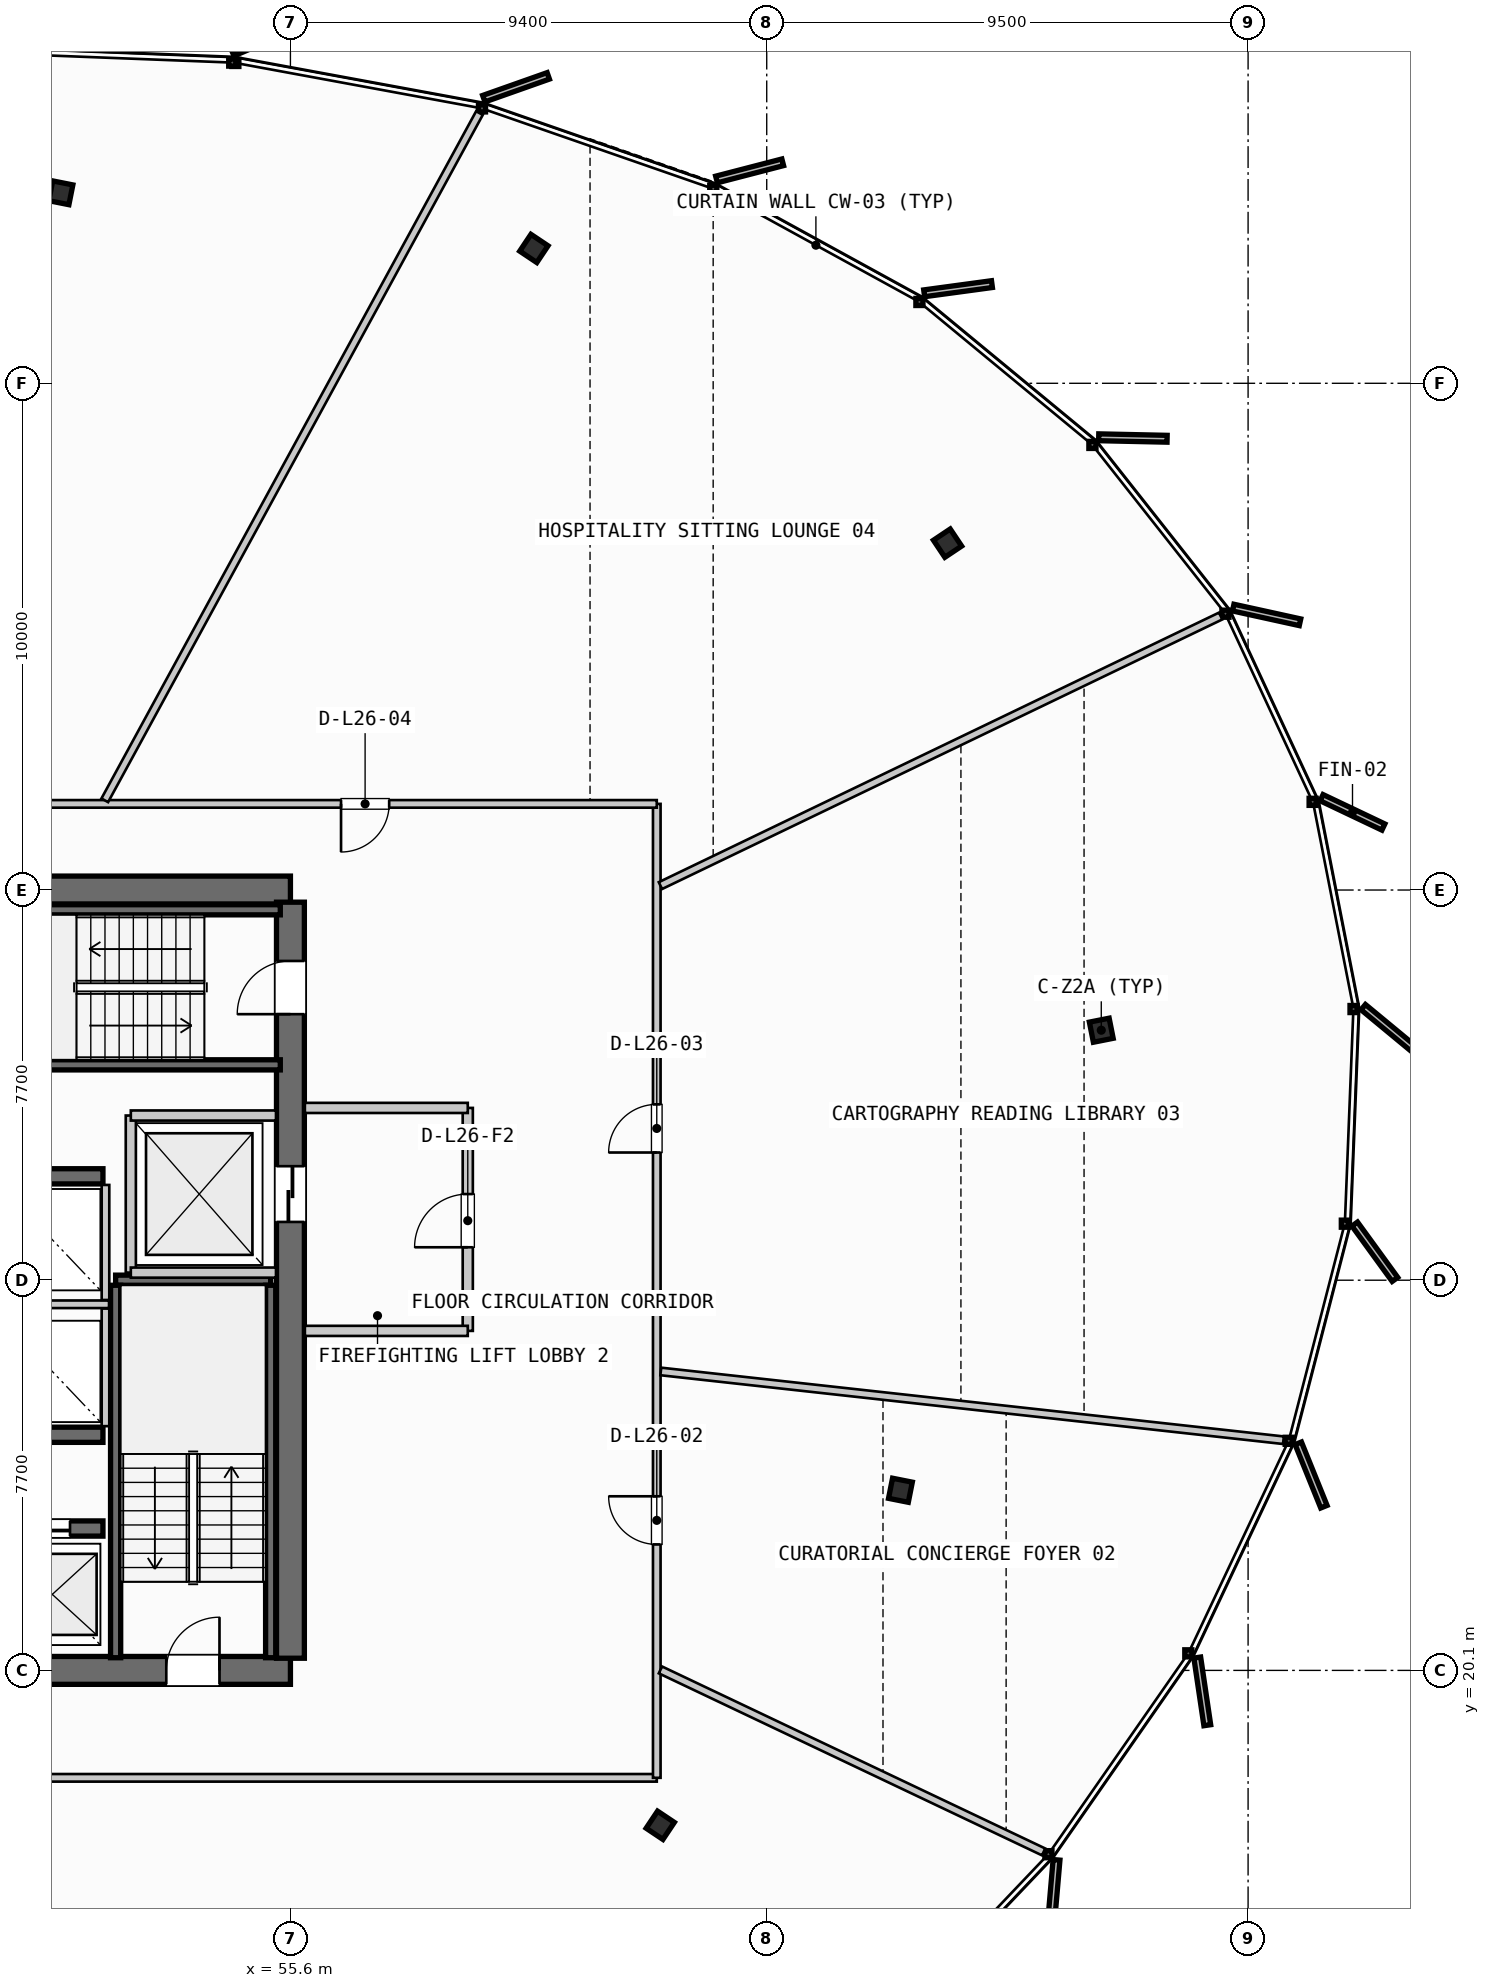
"""IFC4 building model, lengths in metres.
Left out: names, types, materials, properties, quantities, classifications, styles, units other than length and angle.
Written with IfcOpenShell. Run it as: python <this file> out.ifc"""

import sys

from ifc_helpers import new_model, si_unit, direction, frame, frame_2d, origin, origin_2d, place, context, subcontext, project, spatial, rectangle, i_section, extrude, source, transform, mapped, element, fill, save


model = new_model("IFC4")
c1 = context("Model", 3, precision=1e-05, world=origin(), true_north=direction((0.0, 1.0)))
c2 = subcontext(c1, "Body", "Model", "MODEL_VIEW")
j1 = project(units=[si_unit("LENGTHUNIT", "METRE"), si_unit("PLANEANGLEUNIT", "RADIAN")], contexts=[c1])
p1 = place(None, origin())
s1 = spatial("IfcSite", under=j1, at=p1, CompositionType="ELEMENT")
p2 = place(p1, origin())
s2 = spatial("IfcBuilding", under=s1, at=p2, CompositionType="ELEMENT")
p3 = place(p2, frame((0.0, 0.0, 107.2)))
s3 = spatial("IfcBuildingStorey", under=s2, at=p3, CompositionType="ELEMENT", Elevation=107.2)
p4 = place(p3, frame((38.0, 20.1, 0.0), z_axis=(0.0, 0.0, 1.0), x_axis=(1.0, 0.0, 0.0)))
e1 = element("IfcWall", 1, at=p4, inside=s3, PredefinedType="SHEAR", context=c2, shape_type="SweptSolid", body=[
    extrude(rectangle(XDim=17.6, YDim=0.55, at=frame_2d((8.8, 0.0))), origin(), (0.0, 0.0, 1.0), 3.35),
])
p5 = place(p4, frame((1.4, 0.0, 0.0)))
e2 = element("IfcOpeningElement", 2, at=p5, cuts=e1, PredefinedType="OPENING", context=c2, shape_type="SweptSolid", body=[
    extrude(rectangle(XDim=1.05, YDim=2.15, at=frame_2d((0.525, 1.075))), frame((0.0, 0.285, 0.0), z_axis=(0.0, -1.0, 0.0), x_axis=(1.0, 0.0, 0.0)), (0.0, 0.0, 1.0), 0.57),
])
p6 = place(p4, frame((15.15, 0.0, 0.0)))
e3 = element("IfcOpeningElement", 3, at=p6, cuts=e1, PredefinedType="OPENING", context=c2, shape_type="SweptSolid", body=[
    extrude(rectangle(XDim=1.05, YDim=2.15, at=frame_2d((0.525, 1.075))), frame((0.0, 0.285, 0.0), z_axis=(0.0, -1.0, 0.0), x_axis=(1.0, 0.0, 0.0)), (0.0, 0.0, 1.0), 0.57),
])
p7 = place(p3, frame((55.6, 35.5, 0.0), z_axis=(0.0, 0.0, 1.0), x_axis=(-1.0, 0.0, 0.0)))
e4 = element("IfcWall", 4, at=p7, inside=s3, PredefinedType="SHEAR", context=c2, shape_type="SweptSolid", body=[
    extrude(rectangle(XDim=17.6, YDim=0.55, at=frame_2d((8.8, 0.0))), origin(), (0.0, 0.0, 1.0), 3.35),
])
p8 = place(p7, frame((8.05, 0.0, 0.0)))
e5 = element("IfcOpeningElement", 5, at=p8, cuts=e4, PredefinedType="OPENING", context=c2, shape_type="SweptSolid", body=[
    extrude(rectangle(XDim=1.5, YDim=2.2, at=frame_2d((0.75, 1.1))), frame((0.0, 0.285, 0.0), z_axis=(0.0, -1.0, 0.0), x_axis=(1.0, 0.0, 0.0)), (0.0, 0.0, 1.0), 0.57),
])
p9 = place(p7, frame((14.95, 0.0, 0.0)))
e6 = element("IfcOpeningElement", 6, at=p9, cuts=e4, PredefinedType="OPENING", context=c2, shape_type="SweptSolid", body=[
    extrude(rectangle(XDim=1.4, YDim=2.3, at=frame_2d((0.7, 1.15))), frame((0.0, 0.285, 0.0), z_axis=(0.0, -1.0, 0.0), x_axis=(1.0, 0.0, 0.0)), (0.0, 0.0, 1.0), 0.57),
])
p10 = place(p7, frame((12.9, 0.0, 0.0)))
e7 = element("IfcOpeningElement", 7, at=p10, cuts=e4, PredefinedType="OPENING", context=c2, shape_type="SweptSolid", body=[
    extrude(rectangle(XDim=0.9, YDim=2.15, at=frame_2d((0.45, 1.075))), frame((0.0, 0.285, 0.0), z_axis=(0.0, -1.0, 0.0), x_axis=(1.0, 0.0, 0.0)), (0.0, 0.0, 1.0), 0.57),
])
p11 = place(p7, frame((10.6, 0.0, 0.0)))
e8 = element("IfcOpeningElement", 8, at=p11, cuts=e4, PredefinedType="OPENING", context=c2, shape_type="SweptSolid", body=[
    extrude(rectangle(XDim=0.95, YDim=2.15, at=frame_2d((0.475, 1.075))), frame((0.0, 0.285, 0.0), z_axis=(0.0, -1.0, 0.0), x_axis=(1.0, 0.0, 0.0)), (0.0, 0.0, 1.0), 0.57),
])
p12 = place(p3, frame((55.6, 20.34, 0.0), z_axis=(0.0, 0.0, 1.0), x_axis=(0.0, 1.0, 0.0)))
e9 = element("IfcWall", 9, at=p12, inside=s3, PredefinedType="SHEAR", context=c2, shape_type="SweptSolid", body=[
    extrude(rectangle(XDim=14.92, YDim=0.55, at=frame_2d((7.46, 0.0))), origin(), (0.0, 0.0, 1.0), 3.35),
])
p13 = place(p12, frame((12.71, 0.0, 0.0)))
e10 = element("IfcOpeningElement", 10, at=p13, cuts=e9, PredefinedType="OPENING", context=c2, shape_type="SweptSolid", body=[
    extrude(rectangle(XDim=1.05, YDim=2.15, at=frame_2d((0.525, 1.075))), frame((0.0, 0.285, 0.0), z_axis=(0.0, -1.0, 0.0), x_axis=(1.0, 0.0, 0.0)), (0.0, 0.0, 1.0), 0.57),
])
p14 = place(p12, frame((8.61, 0.0, 0.0)))
e11 = element("IfcOpeningElement", 11, at=p14, cuts=e9, PredefinedType="OPENING", context=c2, shape_type="SweptSolid", body=[
    extrude(rectangle(XDim=1.1, YDim=2.2, at=frame_2d((0.55, 1.1))), frame((0.0, 0.285, 0.0), z_axis=(0.0, -1.0, 0.0), x_axis=(1.0, 0.0, 0.0)), (0.0, 0.0, 1.0), 0.57),
])
p15 = place(p3, frame((47.65, 22.9, 0.0), z_axis=(0.0, 0.0, 1.0), x_axis=(1.0, 0.0, 0.0)))
e12 = element("IfcWall", 12, at=p15, inside=s3, PredefinedType="SHEAR", context=c2, shape_type="SweptSolid", body=[
    extrude(rectangle(XDim=4.25, YDim=0.3, at=frame_2d((2.125, 0.0))), origin(), (0.0, 0.0, 1.0), 3.35),
])
p16 = place(p15, frame((0.45, 0.0, 0.0)))
e13 = element("IfcOpeningElement", 13, at=p16, cuts=e12, PredefinedType="OPENING", context=c2, shape_type="SweptSolid", body=[
    extrude(rectangle(XDim=1.1, YDim=2.2, at=frame_2d((0.55, 1.1))), frame((0.0, 0.16, 0.0), z_axis=(0.0, -1.0, 0.0), x_axis=(1.0, 0.0, 0.0)), (0.0, 0.0, 1.0), 0.32),
])
p17 = place(p15, frame((2.5, 0.0, 0.0)))
e14 = element("IfcOpeningElement", 14, at=p17, cuts=e12, PredefinedType="OPENING", context=c2, shape_type="SweptSolid", body=[
    extrude(rectangle(XDim=1.1, YDim=2.2, at=frame_2d((0.55, 1.1))), frame((0.0, 0.16, 0.0), z_axis=(0.0, -1.0, 0.0), x_axis=(1.0, 0.0, 0.0)), (0.0, 0.0, 1.0), 0.32),
])
for number, where, z_axis, x_axis in (
    (15, (47.65, 24.75, 0.0), (0.0, 0.0, 1.0), (1.0, 0.0, 0.0)),
    (16, (47.65, 29.85, 0.0), (0.0, 0.0, 1.0), (1.0, 0.0, 0.0)),
):
    element("IfcWall", number, at=place(p3, frame(where, z_axis=z_axis, x_axis=x_axis)), inside=s3, PredefinedType="SHEAR", context=c2, shape_type="SweptSolid", body=[
        extrude(rectangle(XDim=4.25, YDim=0.3, at=frame_2d((2.125, 0.0))), origin(), (0.0, 0.0, 1.0), 3.35),
    ])
m1 = source(origin(), c2, "Body", "SweptSolid", [
    extrude(i_section(OverallWidth=0.405, OverallDepth=0.398, WebThickness=0.035, FlangeThickness=0.056, FilletRadius=0.015, at=origin_2d()), origin(), (0.0, 0.0, 1.0), 3.35),
])
for number, where, z_axis, x_axis in (
    (17, (71.603, 32.733, 0.0), (0.0, 0.0, 1.0), (0.981, 0.195, 0.0)),
    (18, (68.569, 42.345, 0.0), (0.0, 0.0, 1.0), (0.831, 0.556, 0.0)),
    (19, (60.405, 48.161, 0.0), (0.0, 0.0, 1.0), (0.556, 0.831, 0.0)),
    (20, (51.069, 49.259, 0.0), (0.0, 0.0, 1.0), (0.195, 0.981, 0.0)),
    (21, (62.899, 17.043, 0.0), (0.0, 0.0, 1.0), (0.831, -0.556, 0.0)),
    (22, (67.639, 23.655, 0.0), (0.0, 0.0, 1.0), (0.981, -0.195, 0.0)),
):
    element("IfcColumn", number, at=place(p3, frame(where, z_axis=z_axis, x_axis=x_axis)), inside=s3, PredefinedType="COLUMN", context=c2, shape_type="MappedRepresentation", body=[
        mapped(m1, transform((0.0, 0.0, 0.0), scale=1.0)),
    ])
p18 = place(p3, frame((52.15, 27.8, 0.0), z_axis=(0.0, 0.0, 1.0), x_axis=(1.0, 0.0, 0.0)))
e23 = element("IfcWall", 23, at=p18, inside=s3, PredefinedType="SHEAR", context=c2, shape_type="SweptSolid", body=[
    extrude(rectangle(XDim=3.06, YDim=0.2, at=frame_2d((1.53, 0.0))), origin(), (0.0, 0.0, 1.0), 3.35),
])
for number, where, z_axis, x_axis in (
    (24, (55.21, 27.7, 0.0), (0.0, 0.0, 1.0), (0.0, -1.0, 0.0)),
    (25, (52.15, 20.35, 0.0), (0.0, 0.0, 1.0), (0.0, 1.0, 0.0)),
    (26, (48.05, 35.11, 0.0), (0.0, 0.0, 1.0), (1.0, 0.0, 0.0)),
    (27, (55.4, 32.05, 0.0), (0.0, 0.0, 1.0), (-1.0, 0.0, 0.0)),
):
    element("IfcWall", number, at=place(p3, frame(where, z_axis=z_axis, x_axis=x_axis)), inside=s3, PredefinedType="SHEAR", context=c2, shape_type="SweptSolid", body=[
        extrude(rectangle(XDim=7.35, YDim=0.2, at=frame_2d((3.675, 0.0))), origin(), (0.0, 0.0, 1.0), 3.35),
    ])
p19 = place(p3, frame((52.45, 27.95, 0.0), z_axis=(0.0, 0.0, 1.0), x_axis=(0.0, 1.0, 0.0)))
e28 = element("IfcWall", 28, at=p19, inside=s3, PredefinedType="PARTITIONING", context=c2, shape_type="SweptSolid", body=[
    extrude(rectangle(XDim=3.1, YDim=0.2, at=frame_2d((1.55, 0.0))), origin(), (0.0, 0.0, 1.0), 2.28),
])
for number, where, z_axis, x_axis in (
    (29, (52.45, 27.95, 0.0), (0.0, 0.0, 1.0), (1.0, 0.0, 0.0)),
    (30, (52.45, 31.05, 0.0), (0.0, 0.0, 1.0), (1.0, 0.0, 0.0)),
):
    element("IfcWall", number, at=place(p3, frame(where, z_axis=z_axis, x_axis=x_axis)), inside=s3, PredefinedType="PARTITIONING", context=c2, shape_type="SweptSolid", body=[
        extrude(rectangle(XDim=2.865, YDim=0.2, at=frame_2d((1.433, 0.0))), origin(), (0.0, 0.0, 1.0), 2.28),
    ])
p20 = place(p3, frame((59.1, 26.8, 0.0), z_axis=(0.0, 0.0, 1.0), x_axis=(0.0, 1.0, 0.0)))
e31 = element("IfcWall", 31, at=p20, inside=s3, PredefinedType="PARTITIONING", context=c2, shape_type="SweptSolid", body=[
    extrude(rectangle(XDim=4.4, YDim=0.2, at=frame_2d((2.2, 0.0))), origin(), (0.0, 0.0, 1.0), 2.28),
])
p21 = place(p20, frame((1.65, 0.0, 0.0)))
e32 = element("IfcOpeningElement", 32, at=p21, cuts=e31, PredefinedType="OPENING", context=c2, shape_type="SweptSolid", body=[
    extrude(rectangle(XDim=1.05, YDim=2.15, at=frame_2d((0.525, 1.075))), frame((0.0, 0.11, 0.0), z_axis=(0.0, -1.0, 0.0), x_axis=(1.0, 0.0, 0.0)), (0.0, 0.0, 1.0), 0.22),
])
for number, where, z_axis, x_axis in (
    (33, (55.885, 26.8, 0.0), (0.0, 0.0, 1.0), (1.0, 0.0, 0.0)),
    (34, (55.885, 31.2, 0.0), (0.0, 0.0, 1.0), (1.0, 0.0, 0.0)),
):
    element("IfcWall", number, at=place(p3, frame(where, z_axis=z_axis, x_axis=x_axis)), inside=s3, PredefinedType="PARTITIONING", context=c2, shape_type="SweptSolid", body=[
        extrude(rectangle(XDim=3.215, YDim=0.2, at=frame_2d((1.607, 0.0))), origin(), (0.0, 0.0, 1.0), 2.28),
    ])
p22 = place(p3, frame((47.7, 27.325, 0.0), z_axis=(0.0, 0.0, 1.0), x_axis=(1.0, 0.0, 0.0)))
e35 = element("IfcWall", 35, at=p22, inside=s3, PredefinedType="PARTITIONING", context=c2, shape_type="SweptSolid", body=[
    extrude(rectangle(XDim=4.32, YDim=0.15, at=frame_2d((2.16, 0.0))), origin(), (0.0, 0.0, 1.0), 2.28),
])
p23 = place(p3, frame((51.95, 24.92, 0.0), z_axis=(0.0, 0.0, 1.0), x_axis=(0.0, 1.0, 0.0)))
e36 = element("IfcWall", 36, at=p23, inside=s3, PredefinedType="PARTITIONING", context=c2, shape_type="SweptSolid", body=[
    extrude(rectangle(XDim=2.32, YDim=0.15, at=frame_2d((1.16, 0.0))), origin(), (0.0, 0.0, 1.0), 2.28),
])
p24 = place(p3, frame((51.95, 27.41, 0.0), z_axis=(0.0, 0.0, 1.0), x_axis=(0.0, 1.0, 0.0)))
e37 = element("IfcWall", 37, at=p24, inside=s3, PredefinedType="PARTITIONING", context=c2, shape_type="SweptSolid", body=[
    extrude(rectangle(XDim=2.27, YDim=0.15, at=frame_2d((1.135, 0.0))), origin(), (0.0, 0.0, 1.0), 2.28),
])
p25 = place(p3, frame((32.33, 17.98, 0.0), z_axis=(0.0, 0.0, 1.0), x_axis=(1.0, 0.0, 0.0)))
e38 = element("IfcWall", 38, at=p25, inside=s3, PredefinedType="PARTITIONING", context=c2, shape_type="SweptSolid", body=[
    extrude(rectangle(XDim=30.5, YDim=0.15, at=frame_2d((15.25, 0.0))), origin(), (0.0, 0.0, 1.0), 2.28),
])
p26 = place(p25, frame((14.775, 0.0, 0.0)))
e39 = element("IfcOpeningElement", 39, at=p26, cuts=e38, PredefinedType="OPENING", context=c2, shape_type="SweptSolid", body=[
    extrude(rectangle(XDim=0.95, YDim=2.15, at=frame_2d((0.475, 1.075))), frame((0.0, 0.085, 0.0), z_axis=(0.0, -1.0, 0.0), x_axis=(1.0, 0.0, 0.0)), (0.0, 0.0, 1.0), 0.17),
])
p27 = place(p3, frame((62.83, 17.98, 0.0), z_axis=(0.0, 0.0, 1.0), x_axis=(0.0, 1.0, 0.0)))
e40 = element("IfcWall", 40, at=p27, inside=s3, PredefinedType="PARTITIONING", context=c2, shape_type="SweptSolid", body=[
    extrude(rectangle(XDim=19.22, YDim=0.15, at=frame_2d((9.61, 0.0))), origin(), (0.0, 0.0, 1.0), 2.28),
])
p28 = place(p27, frame((4.606, 0.0, 0.0)))
e41 = element("IfcOpeningElement", 41, at=p28, cuts=e40, PredefinedType="OPENING", context=c2, shape_type="SweptSolid", body=[
    extrude(rectangle(XDim=0.95, YDim=2.15, at=frame_2d((0.475, 1.075))), frame((0.0, 0.085, 0.0), z_axis=(0.0, -1.0, 0.0), x_axis=(1.0, 0.0, 0.0)), (0.0, 0.0, 1.0), 0.17),
])
p29 = place(p27, frame((12.34, 0.0, 0.0)))
e42 = element("IfcOpeningElement", 42, at=p29, cuts=e40, PredefinedType="OPENING", context=c2, shape_type="SweptSolid", body=[
    extrude(rectangle(XDim=0.95, YDim=2.15, at=frame_2d((0.475, 1.075))), frame((0.0, 0.085, 0.0), z_axis=(0.0, -1.0, 0.0), x_axis=(1.0, 0.0, 0.0)), (0.0, 0.0, 1.0), 0.17),
])
p30 = place(p3, frame((62.83, 37.2, 0.0), z_axis=(0.0, 0.0, 1.0), x_axis=(-1.0, 0.0, 0.0)))
e43 = element("IfcWall", 43, at=p30, inside=s3, PredefinedType="PARTITIONING", context=c2, shape_type="SweptSolid", body=[
    extrude(rectangle(XDim=30.5, YDim=0.15, at=frame_2d((15.25, 0.0))), origin(), (0.0, 0.0, 1.0), 2.28),
])
p31 = place(p30, frame((5.281, 0.0, 0.0)))
e44 = element("IfcOpeningElement", 44, at=p31, cuts=e43, PredefinedType="OPENING", context=c2, shape_type="SweptSolid", body=[
    extrude(rectangle(XDim=0.95, YDim=2.15, at=frame_2d((0.475, 1.075))), frame((0.0, 0.085, 0.0), z_axis=(0.0, -1.0, 0.0), x_axis=(1.0, 0.0, 0.0)), (0.0, 0.0, 1.0), 0.17),
])
p32 = place(p30, frame((19.932, 0.0, 0.0)))
e45 = element("IfcOpeningElement", 45, at=p32, cuts=e43, PredefinedType="OPENING", context=c2, shape_type="SweptSolid", body=[
    extrude(rectangle(XDim=0.95, YDim=2.15, at=frame_2d((0.475, 1.075))), frame((0.0, 0.085, 0.0), z_axis=(0.0, -1.0, 0.0), x_axis=(1.0, 0.0, 0.0)), (0.0, 0.0, 1.0), 0.17),
])
p33 = place(p3, frame((62.902, 20.11, 0.0), z_axis=(0.0, 0.0, 1.0), x_axis=(0.903290218611, -0.429030046689, 0.0)))
e46 = element("IfcWall", 46, at=p33, inside=s3, PredefinedType="PARTITIONING", context=c2, shape_type="SweptSolid", body=[
    extrude(rectangle(XDim=8.372, YDim=0.15, at=frame_2d((4.186, 0.0))), origin(), (0.0, 0.0, 1.0), 2.28),
])
p34 = place(p3, frame((62.909, 26.0, 0.0), z_axis=(0.0, 0.0, 1.0), x_axis=(0.993956010133, -0.109779096009, 0.0)))
e47 = element("IfcWall", 47, at=p34, inside=s3, PredefinedType="PARTITIONING", context=c2, shape_type="SweptSolid", body=[
    extrude(rectangle(XDim=12.363, YDim=0.15, at=frame_2d((6.181, 0.0))), origin(), (0.0, 0.0, 1.0), 2.28),
])
p35 = place(p3, frame((62.902, 35.587, 0.0), z_axis=(0.0, 0.0, 1.0), x_axis=(0.901117147689, 0.433575698283, 0.0)))
e48 = element("IfcWall", 48, at=p35, inside=s3, PredefinedType="PARTITIONING", context=c2, shape_type="SweptSolid", body=[
    extrude(rectangle(XDim=12.27, YDim=0.15, at=frame_2d((6.135, 0.0))), origin(), (0.0, 0.0, 1.0), 2.28),
])
p36 = place(p3, frame((51.936, 37.27, 0.0), z_axis=(0.0, 0.0, 1.0), x_axis=(0.47870484944, 0.877975892108, 0.0)))
e49 = element("IfcWall", 49, at=p36, inside=s3, PredefinedType="PARTITIONING", context=c2, shape_type="SweptSolid", body=[
    extrude(rectangle(XDim=15.448, YDim=0.15, at=frame_2d((7.724, 0.0))), origin(), (0.0, 0.0, 1.0), 2.28),
])
m2 = source(origin(), c2, "Body", "SweptSolid", [
    extrude(rectangle(XDim=1.05, YDim=2.15, at=frame_2d((0.525, 1.075))), frame((0.0, 0.025, 0.0), z_axis=(0.0, -1.0, 0.0), x_axis=(1.0, 0.0, 0.0)), (0.0, 0.0, 1.0), 0.05),
])
p37 = place(p6, origin())
e50 = element("IfcDoor", 50, at=p37, inside=s3, OperationType="SINGLE_SWING_RIGHT", PredefinedType="DOOR", context=c2, shape_type="MappedRepresentation", body=[
    mapped(m2, transform((0.0, 0.0, 0.0), scale=1.0)),
])
fill(e3, e50)
p38 = place(p13, origin())
e51 = element("IfcDoor", 51, at=p38, inside=s3, OperationType="SINGLE_SWING_LEFT", PredefinedType="DOOR", context=c2, shape_type="MappedRepresentation", body=[
    mapped(m2, transform((0.0, 0.0, 0.0), scale=1.0)),
])
fill(e10, e51)
m3 = source(origin(), c2, "Body", "SweptSolid", [
    extrude(rectangle(XDim=1.1, YDim=2.2, at=frame_2d((0.55, 1.1))), frame((0.0, 0.025, 0.0), z_axis=(0.0, -1.0, 0.0), x_axis=(1.0, 0.0, 0.0)), (0.0, 0.0, 1.0), 0.05),
])
p39 = place(p14, origin())
e52 = element("IfcDoor", 52, at=p39, inside=s3, OperationType="SLIDING_TO_RIGHT", PredefinedType="DOOR", context=c2, shape_type="MappedRepresentation", body=[
    mapped(m3, transform((0.0, 0.0, 0.0), scale=1.0)),
])
fill(e11, e52)
p40 = place(p17, origin())
e53 = element("IfcDoor", 53, at=p40, inside=s3, OperationType="SLIDING_TO_LEFT", PredefinedType="DOOR", context=c2, shape_type="MappedRepresentation", body=[
    mapped(m3, transform((0.0, 0.0, 0.0), scale=1.0)),
])
fill(e14, e53)
p41 = place(p21, origin())
e54 = element("IfcDoor", 54, at=p41, inside=s3, OperationType="SINGLE_SWING_LEFT", PredefinedType="DOOR", context=c2, shape_type="MappedRepresentation", body=[
    mapped(m2, transform((0.0, 0.0, 0.0), scale=1.0)),
])
fill(e32, e54)
m4 = source(origin(), c2, "Body", "SweptSolid", [
    extrude(rectangle(XDim=0.95, YDim=2.15, at=frame_2d((0.475, 1.075))), frame((0.0, 0.025, 0.0), z_axis=(0.0, -1.0, 0.0), x_axis=(1.0, 0.0, 0.0)), (0.0, 0.0, 1.0), 0.05),
])
p42 = place(p28, origin())
e55 = element("IfcDoor", 55, at=p42, inside=s3, OperationType="SINGLE_SWING_RIGHT", PredefinedType="DOOR", context=c2, shape_type="MappedRepresentation", body=[
    mapped(m4, transform((0.0, 0.0, 0.0), scale=1.0)),
])
fill(e41, e55)
p43 = place(p29, origin())
e56 = element("IfcDoor", 56, at=p43, inside=s3, OperationType="SINGLE_SWING_LEFT", PredefinedType="DOOR", context=c2, shape_type="MappedRepresentation", body=[
    mapped(m4, transform((0.0, 0.0, 0.0), scale=1.0)),
])
fill(e42, e56)
p44 = place(p31, origin())
e57 = element("IfcDoor", 57, at=p44, inside=s3, OperationType="SINGLE_SWING_RIGHT", PredefinedType="DOOR", context=c2, shape_type="MappedRepresentation", body=[
    mapped(m4, transform((0.0, 0.0, 0.0), scale=1.0)),
])
fill(e44, e57)
save(model, sys.argv[1])
